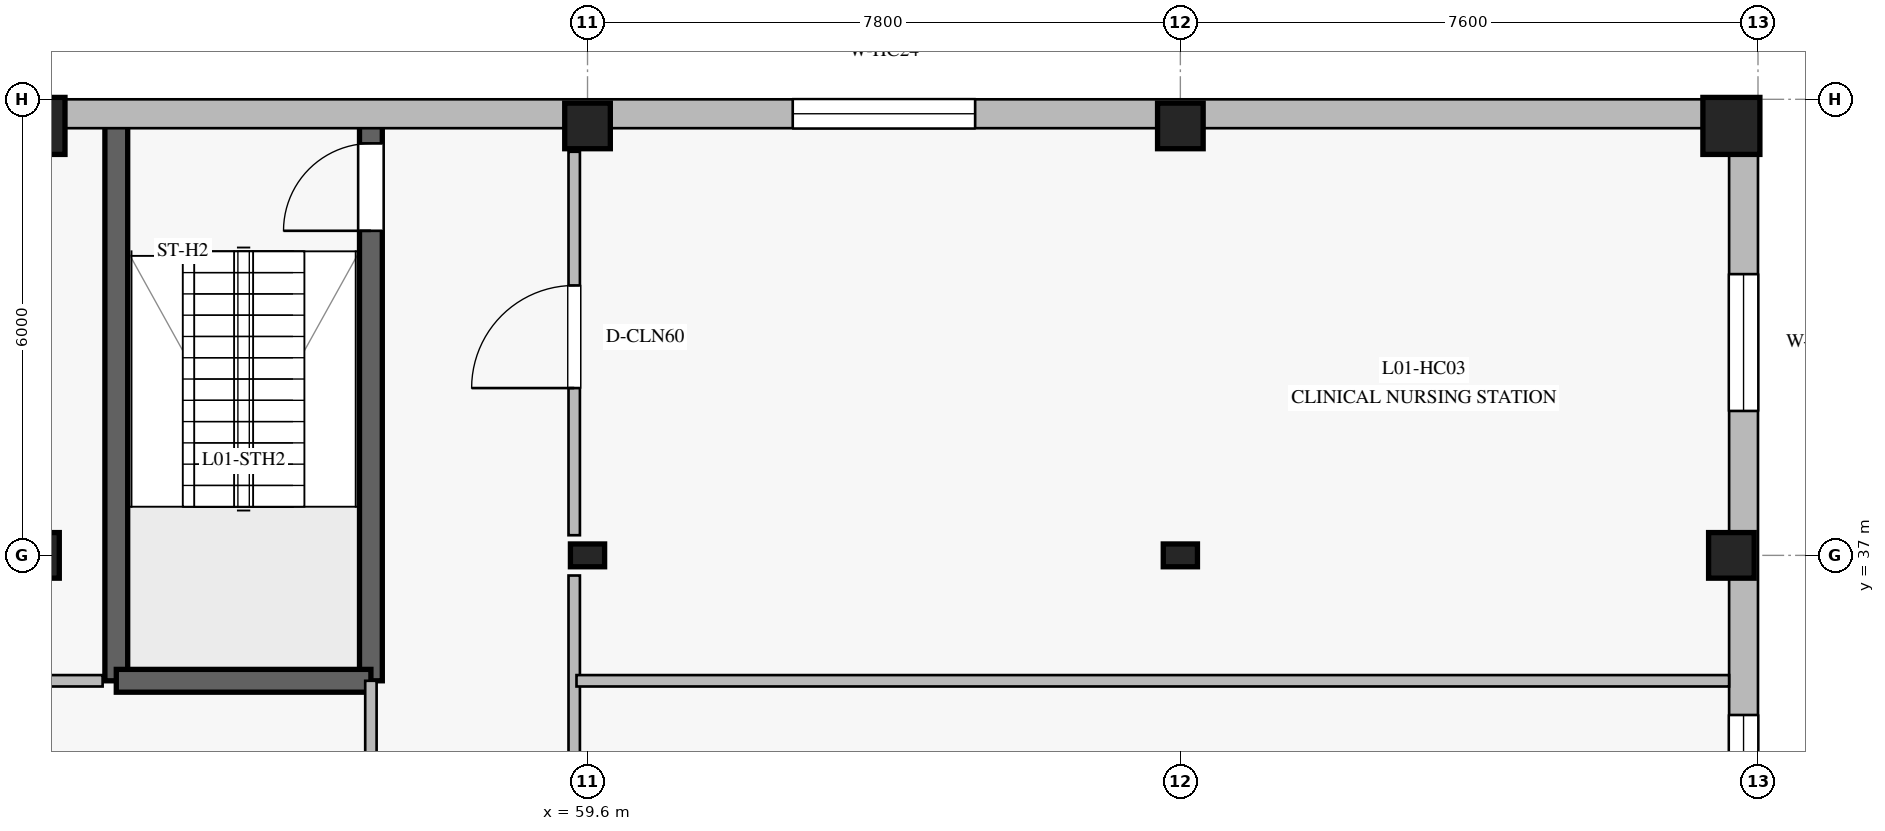
"""IFC4 building model, lengths in metres.
Left out: names, types, materials, properties, quantities, classifications, styles, units other than length and angle.
Written with IfcOpenShell. Run it as: python <this file> out.ifc"""

import sys

from ifc_helpers import new_model, si_unit, direction, frame, frame_2d, origin, origin_2d, place, context, subcontext, project, spatial, rectangle, i_section, extrude, element, fill, save


model = new_model("IFC4")
c1 = context("Model", 3, precision=1e-05, world=origin(), true_north=direction((0.0, 1.0)))
c2 = subcontext(c1, "Body", "Model", "MODEL_VIEW")
j1 = project(units=[si_unit("LENGTHUNIT", "METRE"), si_unit("PLANEANGLEUNIT", "RADIAN")], contexts=[c1])
p1 = place(None, origin())
s1 = spatial("IfcSite", under=j1, at=p1, CompositionType="ELEMENT")
p2 = place(p1, origin())
s2 = spatial("IfcBuilding", under=s1, at=p2, CompositionType="ELEMENT")
p3 = place(p2, frame((0.0, 0.0, 5.2)))
s3 = spatial("IfcBuildingStorey", under=s2, at=p3, CompositionType="ELEMENT", Elevation=5.2)
p4 = place(p3, frame((56.75, 35.35, 0.0), z_axis=(0.0, 0.0, 1.0), x_axis=(0.0, 1.0, 0.0)))
e1 = element("IfcWall", 1, at=p4, inside=s3, PredefinedType="SOLIDWALL", context=c2, shape_type="SweptSolid", body=[
    extrude(rectangle(XDim=7.3, YDim=0.3, at=frame_2d((3.65, 0.0))), origin(), (0.0, 0.0, 1.0), 4.34),
])
p5 = place(p4, frame((5.92, 0.0, 0.0)))
e2 = element("IfcOpeningElement", 2, at=p5, cuts=e1, PredefinedType="OPENING", context=c2, shape_type="SweptSolid", body=[
    extrude(rectangle(XDim=1.15, YDim=2.2, at=frame_2d((0.575, 1.1))), frame((0.0, 0.16, 0.0), z_axis=(0.0, -1.0, 0.0), x_axis=(1.0, 0.0, 0.0)), (0.0, 0.0, 1.0), 0.32),
])
p6 = place(p3, frame((53.4, 35.35, 0.0), z_axis=(0.0, 0.0, 1.0), x_axis=(0.0, 1.0, 0.0)))
e3 = element("IfcWall", 3, at=p6, inside=s3, PredefinedType="SOLIDWALL", context=c2, shape_type="SweptSolid", body=[
    extrude(rectangle(XDim=7.3, YDim=0.3, at=frame_2d((3.65, 0.0))), origin(), (0.0, 0.0, 1.0), 4.34),
])
p7 = place(p3, frame((53.4, 35.35, 0.0), z_axis=(0.0, 0.0, 1.0), x_axis=(1.0, 0.0, 0.0)))
e4 = element("IfcWall", 4, at=p7, inside=s3, PredefinedType="SOLIDWALL", context=c2, shape_type="SweptSolid", body=[
    extrude(rectangle(XDim=3.35, YDim=0.3, at=frame_2d((1.675, 0.0))), origin(), (0.0, 0.0, 1.0), 4.34),
])
p8 = place(p3, frame((52.35, 37.0, 0.0), z_axis=(0.0, 0.0, 1.0), x_axis=(1.0, 0.0, 0.0)))
e5 = element("IfcColumn", 5, at=p8, inside=s3, PredefinedType="COLUMN", context=c2, shape_type="SweptSolid", body=[
    extrude(rectangle(XDim=0.6, YDim=0.6, at=origin_2d()), origin(), (0.0, 0.0, 1.0), 4.6),
])
p9 = place(p3, frame((52.35, 42.65, 0.0), z_axis=(0.0, 0.0, 1.0), x_axis=(1.0, 0.0, 0.0)))
e6 = element("IfcColumn", 6, at=p9, inside=s3, PredefinedType="COLUMN", context=c2, shape_type="SweptSolid", body=[
    extrude(rectangle(XDim=0.75, YDim=0.75, at=origin_2d()), origin(), (0.0, 0.0, 1.0), 4.6),
])
p10 = place(p3, frame((59.6, 37.0, 0.0), z_axis=(0.0, 0.0, 1.0), x_axis=(1.0, 0.0, 0.0)))
e7 = element("IfcColumn", 7, at=p10, inside=s3, PredefinedType="COLUMN", context=c2, shape_type="SweptSolid", body=[
    extrude(i_section(OverallWidth=0.3, OverallDepth=0.45, WebThickness=0.014, FlangeThickness=0.026, at=origin_2d()), origin(), (0.0, 0.0, 1.0), 4.6),
])
p11 = place(p3, frame((59.6, 42.65, 0.0), z_axis=(0.0, 0.0, 1.0), x_axis=(1.0, 0.0, 0.0)))
e8 = element("IfcColumn", 8, at=p11, inside=s3, PredefinedType="COLUMN", context=c2, shape_type="SweptSolid", body=[
    extrude(rectangle(XDim=0.6, YDim=0.6, at=origin_2d()), origin(), (0.0, 0.0, 1.0), 4.6),
])
p12 = place(p3, frame((67.4, 37.0, 0.0), z_axis=(0.0, 0.0, 1.0), x_axis=(1.0, 0.0, 0.0)))
e9 = element("IfcColumn", 9, at=p12, inside=s3, PredefinedType="COLUMN", context=c2, shape_type="SweptSolid", body=[
    extrude(i_section(OverallWidth=0.3, OverallDepth=0.45, WebThickness=0.014, FlangeThickness=0.026, at=origin_2d()), origin(), (0.0, 0.0, 1.0), 4.6),
])
for number, where, z_axis, x_axis in (
    (10, (67.4, 42.65, 0.0), (0.0, 0.0, 1.0), (1.0, 0.0, 0.0)),
    (11, (74.65, 37.0, 0.0), (0.0, 0.0, 1.0), (1.0, 0.0, 0.0)),
):
    element("IfcColumn", number, at=place(p3, frame(where, z_axis=z_axis, x_axis=x_axis)), inside=s3, PredefinedType="COLUMN", context=c2, shape_type="SweptSolid", body=[
        extrude(rectangle(XDim=0.6, YDim=0.6, at=origin_2d()), origin(), (0.0, 0.0, 1.0), 4.6),
    ])
p13 = place(p3, frame((74.65, 42.65, 0.0), z_axis=(0.0, 0.0, 1.0), x_axis=(1.0, 0.0, 0.0)))
e12 = element("IfcColumn", 12, at=p13, inside=s3, PredefinedType="COLUMN", context=c2, shape_type="SweptSolid", body=[
    extrude(rectangle(XDim=0.75, YDim=0.75, at=origin_2d()), origin(), (0.0, 0.0, 1.0), 4.6),
])
p14 = place(p3, frame((52.0, 42.81, 0.0), z_axis=(0.0, 0.0, 1.0), x_axis=(1.0, 0.0, 0.0)))
e13 = element("IfcWall", 13, at=p14, inside=s3, PredefinedType="STANDARD", context=c2, shape_type="SweptSolid", body=[
    extrude(rectangle(XDim=23.0, YDim=0.38, at=frame_2d((11.5, 0.0))), origin(), (0.0, 0.0, 1.0), 4.34),
])
p15 = place(p14, frame((10.3, 0.0, 0.95)))
e14 = element("IfcOpeningElement", 14, at=p15, cuts=e13, PredefinedType="OPENING", context=c2, shape_type="SweptSolid", body=[
    extrude(rectangle(XDim=2.4, YDim=1.8, at=frame_2d((1.2, 0.9))), frame((0.0, 0.2, 0.0), z_axis=(0.0, -1.0, 0.0), x_axis=(1.0, 0.0, 0.0)), (0.0, 0.0, 1.0), 0.4),
])
p16 = place(p3, frame((74.81, 42.62, 0.0), z_axis=(0.0, 0.0, 1.0), x_axis=(0.0, -1.0, 0.0)))
e15 = element("IfcWall", 15, at=p16, inside=s3, PredefinedType="STANDARD", context=c2, shape_type="SweptSolid", body=[
    extrude(rectangle(XDim=35.24, YDim=0.38, at=frame_2d((17.62, 0.0))), origin(), (0.0, 0.0, 1.0), 4.34),
])
p17 = place(p16, frame((31.52, 0.0, 0.9)))
e16 = element("IfcOpeningElement", 16, at=p17, cuts=e15, PredefinedType="OPENING", context=c2, shape_type="SweptSolid", body=[
    extrude(rectangle(XDim=1.8, YDim=1.8, at=frame_2d((0.9, 0.9))), frame((0.0, 0.2, 0.0), z_axis=(0.0, -1.0, 0.0), x_axis=(1.0, 0.0, 0.0)), (0.0, 0.0, 1.0), 0.4),
])
p18 = place(p16, frame((25.72, 0.0, 0.9)))
e17 = element("IfcOpeningElement", 17, at=p18, cuts=e15, PredefinedType="OPENING", context=c2, shape_type="SweptSolid", body=[
    extrude(rectangle(XDim=1.8, YDim=1.8, at=frame_2d((0.9, 0.9))), frame((0.0, 0.2, 0.0), z_axis=(0.0, -1.0, 0.0), x_axis=(1.0, 0.0, 0.0)), (0.0, 0.0, 1.0), 0.4),
])
p19 = place(p16, frame((19.72, 0.0, 0.9)))
e18 = element("IfcOpeningElement", 18, at=p19, cuts=e15, PredefinedType="OPENING", context=c2, shape_type="SweptSolid", body=[
    extrude(rectangle(XDim=1.8, YDim=1.8, at=frame_2d((0.9, 0.9))), frame((0.0, 0.2, 0.0), z_axis=(0.0, -1.0, 0.0), x_axis=(1.0, 0.0, 0.0)), (0.0, 0.0, 1.0), 0.4),
])
p20 = place(p16, frame((13.72, 0.0, 0.9)))
e19 = element("IfcOpeningElement", 19, at=p20, cuts=e15, PredefinedType="OPENING", context=c2, shape_type="SweptSolid", body=[
    extrude(rectangle(XDim=1.8, YDim=1.8, at=frame_2d((0.9, 0.9))), frame((0.0, 0.2, 0.0), z_axis=(0.0, -1.0, 0.0), x_axis=(1.0, 0.0, 0.0)), (0.0, 0.0, 1.0), 0.4),
])
p21 = place(p16, frame((7.72, 0.0, 0.9)))
e20 = element("IfcOpeningElement", 20, at=p21, cuts=e15, PredefinedType="OPENING", context=c2, shape_type="SweptSolid", body=[
    extrude(rectangle(XDim=1.8, YDim=1.8, at=frame_2d((0.9, 0.9))), frame((0.0, 0.2, 0.0), z_axis=(0.0, -1.0, 0.0), x_axis=(1.0, 0.0, 0.0)), (0.0, 0.0, 1.0), 0.4),
])
p22 = place(p16, frame((1.92, 0.0, 0.9)))
e21 = element("IfcOpeningElement", 21, at=p22, cuts=e15, PredefinedType="OPENING", context=c2, shape_type="SweptSolid", body=[
    extrude(rectangle(XDim=1.8, YDim=1.8, at=frame_2d((0.9, 0.9))), frame((0.0, 0.2, 0.0), z_axis=(0.0, -1.0, 0.0), x_axis=(1.0, 0.0, 0.0)), (0.0, 0.0, 1.0), 0.4),
])
p23 = place(p3, frame((56.75, 14.65, 0.0), z_axis=(0.0, 0.0, 1.0), x_axis=(0.0, 1.0, 0.0)))
e22 = element("IfcWall", 22, at=p23, inside=s3, PredefinedType="PARTITIONING", context=c2, shape_type="SweptSolid", body=[
    extrude(rectangle(XDim=20.7, YDim=0.15, at=frame_2d((10.35, 0.0))), origin(), (0.0, 0.0, 1.0), 4.34),
])
p24 = place(p23, frame((9.675, 0.0, 0.0)))
e23 = element("IfcOpeningElement", 23, at=p24, cuts=e22, PredefinedType="OPENING", context=c2, shape_type="SweptSolid", body=[
    extrude(rectangle(XDim=1.35, YDim=2.2, at=frame_2d((0.675, 1.1))), frame((0.0, 0.085, 0.0), z_axis=(0.0, -1.0, 0.0), x_axis=(1.0, 0.0, 0.0)), (0.0, 0.0, 1.0), 0.17),
])
p25 = place(p3, frame((59.425, 31.265, 0.0), z_axis=(0.0, 0.0, 1.0), x_axis=(0.0, 1.0, 0.0)))
e24 = element("IfcWall", 24, at=p25, inside=s3, PredefinedType="PARTITIONING", context=c2, shape_type="SweptSolid", body=[
    extrude(rectangle(XDim=5.47, YDim=0.15, at=frame_2d((2.735, 0.0))), origin(), (0.0, 0.0, 1.0), 3.98),
])
p26 = place(p3, frame((59.425, 37.265, 0.0), z_axis=(0.0, 0.0, 1.0), x_axis=(0.0, 1.0, 0.0)))
e25 = element("IfcWall", 25, at=p26, inside=s3, PredefinedType="PARTITIONING", context=c2, shape_type="SweptSolid", body=[
    extrude(rectangle(XDim=5.045, YDim=0.15, at=frame_2d((2.522, 0.0))), origin(), (0.0, 0.0, 1.0), 3.98),
])
p27 = place(p26, frame((1.936, 0.0, 0.0)))
e26 = element("IfcOpeningElement", 26, at=p27, cuts=e25, PredefinedType="OPENING", context=c2, shape_type="SweptSolid", body=[
    extrude(rectangle(XDim=1.35, YDim=2.2, at=frame_2d((0.675, 1.1))), frame((0.0, 0.085, 0.0), z_axis=(0.0, -1.0, 0.0), x_axis=(1.0, 0.0, 0.0)), (0.0, 0.0, 1.0), 0.17),
])
p28 = place(p3, frame((52.38, 35.35, 0.0), z_axis=(0.0, 0.0, 1.0), x_axis=(1.0, 0.0, 0.0)))
e27 = element("IfcWall", 27, at=p28, inside=s3, PredefinedType="PARTITIONING", context=c2, shape_type="SweptSolid", body=[
    extrude(rectangle(XDim=0.84, YDim=0.15, at=frame_2d((0.42, 0.0))), origin(), (0.0, 0.0, 1.0), 3.98),
])
p29 = place(p3, frame((59.455, 35.35, 0.0), z_axis=(0.0, 0.0, 1.0), x_axis=(1.0, 0.0, 0.0)))
e28 = element("IfcWall", 28, at=p29, inside=s3, PredefinedType="PARTITIONING", context=c2, shape_type="SweptSolid", body=[
    extrude(rectangle(XDim=15.165, YDim=0.15, at=frame_2d((7.583, 0.0))), origin(), (0.0, 0.0, 1.0), 3.98),
])
p30 = place(p21, origin())
e29 = element("IfcWindow", 29, at=p30, inside=s3, PartitioningType="DOUBLE_PANEL_VERTICAL", PredefinedType="WINDOW", context=c2, shape_type="SweptSolid", body=[
    extrude(rectangle(XDim=1.8, YDim=1.8, at=frame_2d((0.9, 0.9))), frame((0.0, 0.03, 0.0), z_axis=(0.0, -1.0, 0.0), x_axis=(1.0, 0.0, 0.0)), (0.0, 0.0, 1.0), 0.06),
])
fill(e20, e29)
p31 = place(p22, origin())
e30 = element("IfcWindow", 30, at=p31, inside=s3, PartitioningType="DOUBLE_PANEL_VERTICAL", PredefinedType="WINDOW", context=c2, shape_type="SweptSolid", body=[
    extrude(rectangle(XDim=1.8, YDim=1.8, at=frame_2d((0.9, 0.9))), frame((0.0, 0.03, 0.0), z_axis=(0.0, -1.0, 0.0), x_axis=(1.0, 0.0, 0.0)), (0.0, 0.0, 1.0), 0.06),
])
fill(e21, e30)
p32 = place(p15, origin())
e31 = element("IfcWindow", 31, at=p32, inside=s3, PartitioningType="TRIPLE_PANEL_VERTICAL", PredefinedType="WINDOW", context=c2, shape_type="SweptSolid", body=[
    extrude(rectangle(XDim=2.4, YDim=1.8, at=frame_2d((1.2, 0.9))), frame((0.0, 0.03, 0.0), z_axis=(0.0, -1.0, 0.0), x_axis=(1.0, 0.0, 0.0)), (0.0, 0.0, 1.0), 0.06),
])
fill(e14, e31)
p33 = place(p5, origin())
e32 = element("IfcDoor", 32, at=p33, inside=s3, OperationType="SINGLE_SWING_LEFT", PredefinedType="DOOR", context=c2, shape_type="SweptSolid", body=[
    extrude(rectangle(XDim=1.15, YDim=2.2, at=frame_2d((0.575, 1.1))), frame((0.0, 0.025, 0.0), z_axis=(0.0, -1.0, 0.0), x_axis=(1.0, 0.0, 0.0)), (0.0, 0.0, 1.0), 0.05),
])
fill(e2, e32)
p34 = place(p27, origin())
e33 = element("IfcDoor", 33, at=p34, inside=s3, OperationType="SINGLE_SWING_LEFT", PredefinedType="DOOR", context=c2, shape_type="SweptSolid", body=[
    extrude(rectangle(XDim=1.35, YDim=2.2, at=frame_2d((0.675, 1.1))), frame((0.0, 0.025, 0.0), z_axis=(0.0, -1.0, 0.0), x_axis=(1.0, 0.0, 0.0)), (0.0, 0.0, 1.0), 0.05),
])
fill(e26, e33)
save(model, sys.argv[1])
